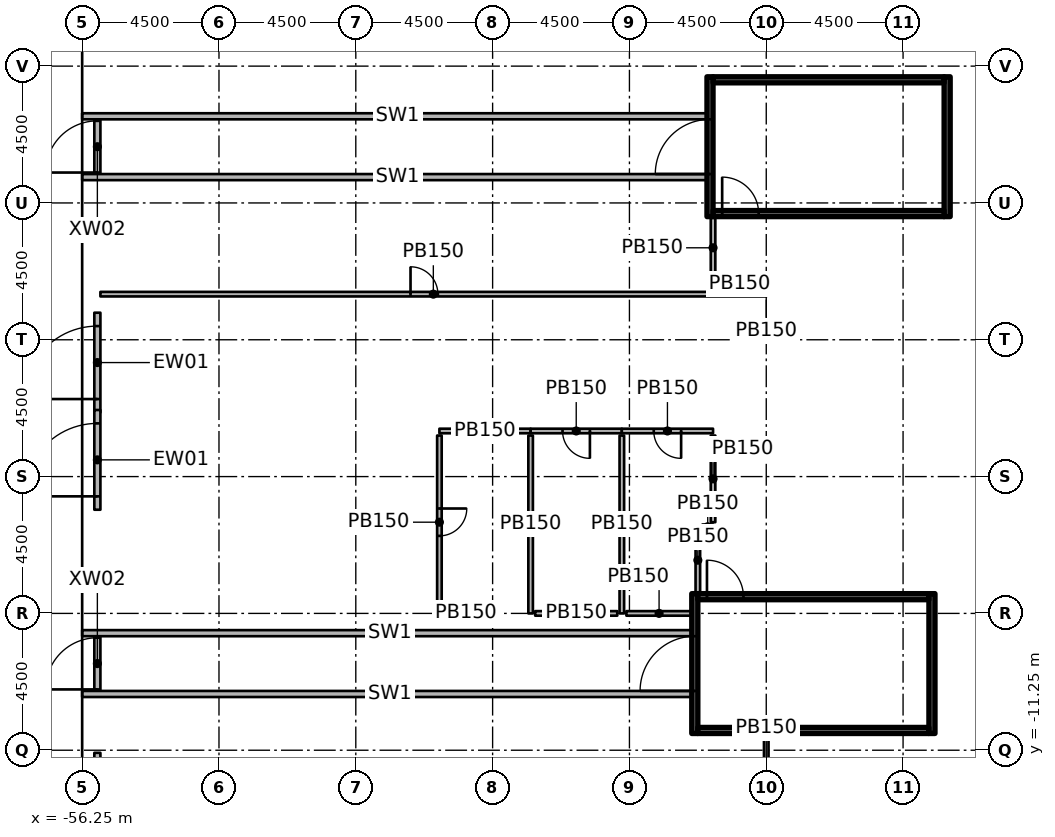
"""IFC4 building model, lengths in metres.
Left out: names, types, materials, properties, quantities, classifications, styles, units other than length and angle.
Written with IfcOpenShell. Run it as: python <this file> out.ifc"""

import sys

from ifc_helpers import new_model, si_unit, direction, frame, frame_2d, origin, origin_2d, place, context, subcontext, project, spatial, rectangle, extrude, element, fill, save


model = new_model("IFC4")
c1 = context("Model", 3, precision=1e-05, world=origin(), true_north=direction((0.0, 1.0)))
c2 = subcontext(c1, "Body", "Model", "MODEL_VIEW")
j1 = project(units=[si_unit("LENGTHUNIT", "METRE"), si_unit("PLANEANGLEUNIT", "RADIAN")], contexts=[c1])
p1 = place(None, origin())
s1 = spatial("IfcSite", under=j1, at=p1, CompositionType="ELEMENT")
p2 = place(p1, origin())
s2 = spatial("IfcBuilding", under=s1, at=p2, CompositionType="ELEMENT")
p3 = place(p2, origin())
s3 = spatial("IfcBuildingStorey", under=s2, at=p3, CompositionType="ELEMENT", Elevation=0.0)
for number, where, z_axis, x_axis in (
    (1, (-55.65, 6.75, 0.0), (0.0, 0.0, 1.0), (1.0, 0.0, 0.0)),
    (2, (-51.15, -11.25, 0.0), (0.0, 0.0, 1.0), (1.0, 0.0, 0.0)),
    (3, (-51.15, 2.25, 0.0), (0.0, 0.0, 1.0), (1.0, 0.0, 0.0)),
    (4, (-46.65, -2.25, 0.0), (0.0, 0.0, 1.0), (1.0, 0.0, 0.0)),
    (5, (-46.65, 11.25, 0.0), (0.0, 0.0, 1.0), (1.0, 0.0, 0.0)),
    (6, (-42.15, 6.75, 0.0), (0.0, 0.0, 1.0), (1.0, 0.0, 0.0)),
    (7, (-37.65, 2.25, 0.0), (0.0, 0.0, 1.0), (1.0, 0.0, 0.0)),
    (8, (-33.11, -2.25, 0.0), (0.0, 0.0, 1.0), (1.0, 0.0, 0.0)),
    (9, (-33.11, 2.25, 0.0), (0.0, 0.0, 1.0), (1.0, 0.0, 0.0)),
    (10, (-28.908, -5.475, 0.0), (0.0, 0.0, 1.0), (1.0, 0.0, 0.0)),
    (11, (-28.908, 5.475, 0.0), (0.0, 0.0, 1.0), (1.0, 0.0, 0.0)),
):
    element("IfcColumn", number, at=place(p3, frame(where, z_axis=z_axis, x_axis=x_axis)), inside=s3, PredefinedType="COLUMN", context=c2, shape_type="SweptSolid", body=[
        extrude(rectangle(XDim=1.2, YDim=1.2, at=origin_2d()), origin(), (0.0, 0.0, 1.0), 6.55),
    ])
p4 = place(p3, frame((-55.75, -0.14, 0.0), z_axis=(0.0, 0.0, 1.0), x_axis=(0.0, 1.0, 0.0)))
e12 = element("IfcWall", 12, at=p4, inside=s3, PredefinedType="SOLIDWALL", context=c2, shape_type="SweptSolid", body=[
    extrude(rectangle(XDim=3.28, YDim=0.2, at=frame_2d((1.64, 0.0))), origin(), (0.0, 0.0, 1.0), 5.6),
])
p5 = place(p4, frame((0.44, 0.0, 0.0)))
e13 = element("IfcOpeningElement", 13, at=p5, cuts=e12, PredefinedType="OPENING", context=c2, shape_type="SweptSolid", body=[
    extrude(rectangle(XDim=2.4, YDim=2.7, at=frame_2d((1.2, 1.35))), frame((0.0, 0.11, 0.0), z_axis=(0.0, -1.0, 0.0), x_axis=(1.0, 0.0, 0.0)), (0.0, 0.0, 1.0), 0.22),
])
p6 = place(p3, frame((-55.75, -3.34, 0.0), z_axis=(0.0, 0.0, 1.0), x_axis=(0.0, 1.0, 0.0)))
e14 = element("IfcWall", 14, at=p6, inside=s3, PredefinedType="SOLIDWALL", context=c2, shape_type="SweptSolid", body=[
    extrude(rectangle(XDim=3.28, YDim=0.2, at=frame_2d((1.64, 0.0))), origin(), (0.0, 0.0, 1.0), 5.6),
])
p7 = place(p6, frame((0.44, 0.0, 0.0)))
e15 = element("IfcOpeningElement", 15, at=p7, cuts=e14, PredefinedType="OPENING", context=c2, shape_type="SweptSolid", body=[
    extrude(rectangle(XDim=2.4, YDim=2.7, at=frame_2d((1.2, 1.35))), frame((0.0, 0.11, 0.0), z_axis=(0.0, -1.0, 0.0), x_axis=(1.0, 0.0, 0.0)), (0.0, 0.0, 1.0), 0.22),
])
p8 = place(p3, frame((-55.75, -14.615, 0.0), z_axis=(0.0, 0.0, 1.0), x_axis=(0.0, 1.0, 0.0)))
e16 = element("IfcWall", 16, at=p8, inside=s3, PredefinedType="SOLIDWALL", context=c2, shape_type="SweptSolid", body=[
    extrude(rectangle(XDim=3.28, YDim=0.2, at=frame_2d((1.64, 0.0))), origin(), (0.0, 0.0, 1.0), 5.6),
])
p9 = place(p8, frame((0.44, 0.0, 0.0)))
e17 = element("IfcOpeningElement", 17, at=p9, cuts=e16, PredefinedType="OPENING", context=c2, shape_type="SweptSolid", body=[
    extrude(rectangle(XDim=2.4, YDim=2.7, at=frame_2d((1.2, 1.35))), frame((0.0, 0.11, 0.0), z_axis=(0.0, -1.0, 0.0), x_axis=(1.0, 0.0, 0.0)), (0.0, 0.0, 1.0), 0.22),
])
p10 = place(p3, frame((-55.75, -9.3, 0.0), z_axis=(0.0, 0.0, 1.0), x_axis=(0.0, 1.0, 0.0)))
e18 = element("IfcWall", 18, at=p10, inside=s3, PredefinedType="SOLIDWALL", context=c2, shape_type="SweptSolid", body=[
    extrude(rectangle(XDim=1.8, YDim=0.2, at=frame_2d((0.9, 0.0))), origin(), (0.0, 0.0, 1.0), 3.0),
])
p11 = place(p10, frame((0.05, 0.0, 0.0)))
e19 = element("IfcOpeningElement", 19, at=p11, cuts=e18, PredefinedType="OPENING", context=c2, shape_type="SweptSolid", body=[
    extrude(rectangle(XDim=1.7, YDim=2.1, at=frame_2d((0.85, 1.05))), frame((0.0, 0.11, 0.0), z_axis=(0.0, -1.0, 0.0), x_axis=(1.0, 0.0, 0.0)), (0.0, 0.0, 1.0), 0.22),
])
p12 = place(p3, frame((-55.75, 7.7, 0.0), z_axis=(0.0, 0.0, 1.0), x_axis=(0.0, 1.0, 0.0)))
e20 = element("IfcWall", 20, at=p12, inside=s3, PredefinedType="SOLIDWALL", context=c2, shape_type="SweptSolid", body=[
    extrude(rectangle(XDim=1.8, YDim=0.2, at=frame_2d((0.9, 0.0))), origin(), (0.0, 0.0, 1.0), 3.0),
])
p13 = place(p12, frame((0.05, 0.0, 0.0)))
e21 = element("IfcOpeningElement", 21, at=p13, cuts=e20, PredefinedType="OPENING", context=c2, shape_type="SweptSolid", body=[
    extrude(rectangle(XDim=1.7, YDim=2.1, at=frame_2d((0.85, 1.05))), frame((0.0, 0.11, 0.0), z_axis=(0.0, -1.0, 0.0), x_axis=(1.0, 0.0, 0.0)), (0.0, 0.0, 1.0), 0.22),
])
p14 = place(p3, frame((-36.1, -10.7, 0.0), z_axis=(0.0, 0.0, 1.0), x_axis=(0.0, 1.0, 0.0)))
e22 = element("IfcWall", 22, at=p14, inside=s3, PredefinedType="SHEAR", context=c2, shape_type="SweptSolid", body=[
    extrude(rectangle(XDim=4.6, YDim=0.2, at=frame_2d((2.3, 0.0))), origin(), (0.0, 0.0, 1.0), 6.55),
])
p15 = place(p14, frame((1.4, 0.0, 0.0)))
e23 = element("IfcOpeningElement", 23, at=p15, cuts=e22, PredefinedType="OPENING", context=c2, shape_type="SweptSolid", body=[
    extrude(rectangle(XDim=1.8, YDim=2.1, at=frame_2d((0.9, 1.05))), frame((0.0, 0.11, 0.0), z_axis=(0.0, -1.0, 0.0), x_axis=(1.0, 0.0, 0.0)), (0.0, 0.0, 1.0), 0.22),
])
p16 = place(p3, frame((-28.3, -10.7, 0.0), z_axis=(0.0, 0.0, 1.0), x_axis=(0.0, 1.0, 0.0)))
e24 = element("IfcWall", 24, at=p16, inside=s3, PredefinedType="SHEAR", context=c2, shape_type="SweptSolid", body=[
    extrude(rectangle(XDim=4.6, YDim=0.2, at=frame_2d((2.3, 0.0))), origin(), (0.0, 0.0, 1.0), 6.55),
])
p17 = place(p3, frame((-36.0, -10.6, 0.0), z_axis=(0.0, 0.0, 1.0), x_axis=(1.0, 0.0, 0.0)))
e25 = element("IfcWall", 25, at=p17, inside=s3, PredefinedType="SHEAR", context=c2, shape_type="SweptSolid", body=[
    extrude(rectangle(XDim=7.6, YDim=0.2, at=frame_2d((3.8, 0.0))), origin(), (0.0, 0.0, 1.0), 6.55),
])
p18 = place(p3, frame((-36.0, -6.2, 0.0), z_axis=(0.0, 0.0, 1.0), x_axis=(1.0, 0.0, 0.0)))
e26 = element("IfcWall", 26, at=p18, inside=s3, PredefinedType="SHEAR", context=c2, shape_type="SweptSolid", body=[
    extrude(rectangle(XDim=7.6, YDim=0.2, at=frame_2d((3.8, 0.0))), origin(), (0.0, 0.0, 1.0), 6.55),
])
p19 = place(p18, frame((0.3, 0.0, 0.0)))
e27 = element("IfcOpeningElement", 27, at=p19, cuts=e26, PredefinedType="OPENING", context=c2, shape_type="SweptSolid", body=[
    extrude(rectangle(XDim=1.2, YDim=2.1, at=frame_2d((0.6, 1.05))), frame((0.0, 0.11, 0.0), z_axis=(0.0, -1.0, 0.0), x_axis=(1.0, 0.0, 0.0)), (0.0, 0.0, 1.0), 0.22),
])
for number, where, z_axis, x_axis in (
    (28, (-56.25, -9.4, 0.0), (0.0, 0.0, 1.0), (1.0, 0.0, 0.0)),
    (29, (-56.25, -7.4, 0.0), (0.0, 0.0, 1.0), (1.0, 0.0, 0.0)),
):
    element("IfcWall", number, at=place(p3, frame(where, z_axis=z_axis, x_axis=x_axis)), inside=s3, PredefinedType="PARTITIONING", context=c2, shape_type="SweptSolid", body=[
        extrude(rectangle(XDim=20.25, YDim=0.2, at=frame_2d((10.125, 0.0))), origin(), (0.0, 0.0, 1.0), 6.55),
    ])
p20 = place(p3, frame((-35.6, 6.3, 0.0), z_axis=(0.0, 0.0, 1.0), x_axis=(0.0, 1.0, 0.0)))
e30 = element("IfcWall", 30, at=p20, inside=s3, PredefinedType="SHEAR", context=c2, shape_type="SweptSolid", body=[
    extrude(rectangle(XDim=4.6, YDim=0.2, at=frame_2d((2.3, 0.0))), origin(), (0.0, 0.0, 1.0), 6.55),
])
p21 = place(p20, frame((1.4, 0.0, 0.0)))
e31 = element("IfcOpeningElement", 31, at=p21, cuts=e30, PredefinedType="OPENING", context=c2, shape_type="SweptSolid", body=[
    extrude(rectangle(XDim=1.8, YDim=2.1, at=frame_2d((0.9, 1.05))), frame((0.0, 0.11, 0.0), z_axis=(0.0, -1.0, 0.0), x_axis=(1.0, 0.0, 0.0)), (0.0, 0.0, 1.0), 0.22),
])
p22 = place(p3, frame((-27.8, 6.3, 0.0), z_axis=(0.0, 0.0, 1.0), x_axis=(0.0, 1.0, 0.0)))
e32 = element("IfcWall", 32, at=p22, inside=s3, PredefinedType="SHEAR", context=c2, shape_type="SweptSolid", body=[
    extrude(rectangle(XDim=4.6, YDim=0.2, at=frame_2d((2.3, 0.0))), origin(), (0.0, 0.0, 1.0), 6.55),
])
p23 = place(p3, frame((-35.5, 6.4, 0.0), z_axis=(0.0, 0.0, 1.0), x_axis=(1.0, 0.0, 0.0)))
e33 = element("IfcWall", 33, at=p23, inside=s3, PredefinedType="SHEAR", context=c2, shape_type="SweptSolid", body=[
    extrude(rectangle(XDim=7.6, YDim=0.2, at=frame_2d((3.8, 0.0))), origin(), (0.0, 0.0, 1.0), 6.55),
])
p24 = place(p23, frame((0.3, 0.0, 0.0)))
e34 = element("IfcOpeningElement", 34, at=p24, cuts=e33, PredefinedType="OPENING", context=c2, shape_type="SweptSolid", body=[
    extrude(rectangle(XDim=1.2, YDim=2.1, at=frame_2d((0.6, 1.05))), frame((0.0, 0.11, 0.0), z_axis=(0.0, -1.0, 0.0), x_axis=(1.0, 0.0, 0.0)), (0.0, 0.0, 1.0), 0.22),
])
p25 = place(p3, frame((-35.5, 10.8, 0.0), z_axis=(0.0, 0.0, 1.0), x_axis=(1.0, 0.0, 0.0)))
e35 = element("IfcWall", 35, at=p25, inside=s3, PredefinedType="SHEAR", context=c2, shape_type="SweptSolid", body=[
    extrude(rectangle(XDim=7.6, YDim=0.2, at=frame_2d((3.8, 0.0))), origin(), (0.0, 0.0, 1.0), 6.55),
])
for number, where, z_axis, x_axis in (
    (36, (-56.25, 7.6, 0.0), (0.0, 0.0, 1.0), (1.0, 0.0, 0.0)),
    (37, (-56.25, 9.6, 0.0), (0.0, 0.0, 1.0), (1.0, 0.0, 0.0)),
):
    element("IfcWall", number, at=place(p3, frame(where, z_axis=z_axis, x_axis=x_axis)), inside=s3, PredefinedType="PARTITIONING", context=c2, shape_type="SweptSolid", body=[
        extrude(rectangle(XDim=20.75, YDim=0.2, at=frame_2d((10.375, 0.0))), origin(), (0.0, 0.0, 1.0), 6.55),
    ])
p26 = place(p3, frame((-36.0, -6.1, 0.0), z_axis=(0.0, 0.0, 1.0), x_axis=(0.0, 1.0, 0.0)))
e38 = element("IfcWall", 38, at=p26, inside=s3, PredefinedType="PARTITIONING", context=c2, shape_type="SweptSolid", body=[
    extrude(rectangle(XDim=2.2, YDim=0.15, at=frame_2d((1.1, 0.0))), origin(), (0.0, 0.0, 1.0), 6.55),
])
p27 = place(p3, frame((-35.85, -3.9, 0.0), z_axis=(0.0, 0.0, 1.0), x_axis=(1.0, 0.0, 0.0)))
e39 = element("IfcWall", 39, at=p27, inside=s3, PredefinedType="PARTITIONING", context=c2, shape_type="SweptSolid", body=[
    extrude(rectangle(XDim=0.35, YDim=0.15, at=frame_2d((0.175, 0.0))), origin(), (0.0, 0.0, 1.0), 6.55),
])
p28 = place(p3, frame((-33.75, 4.1, 0.0), z_axis=(0.0, 0.0, 1.0), x_axis=(-1.0, 0.0, 0.0)))
e40 = element("IfcWall", 40, at=p28, inside=s3, PredefinedType="PARTITIONING", context=c2, shape_type="SweptSolid", body=[
    extrude(rectangle(XDim=1.75, YDim=0.15, at=frame_2d((0.875, 0.0))), origin(), (0.0, 0.0, 1.0), 6.55),
])
p29 = place(p3, frame((-35.5, 4.25, 0.0), z_axis=(0.0, 0.0, 1.0), x_axis=(0.0, 1.0, 0.0)))
e41 = element("IfcWall", 41, at=p29, inside=s3, PredefinedType="PARTITIONING", context=c2, shape_type="SweptSolid", body=[
    extrude(rectangle(XDim=2.05, YDim=0.15, at=frame_2d((1.025, 0.0))), origin(), (0.0, 0.0, 1.0), 6.55),
])
p30 = place(p3, frame((-41.5, -0.75, 0.0), z_axis=(0.0, 0.0, 1.0), x_axis=(-1.0, 0.0, 0.0)))
e42 = element("IfcWall", 42, at=p30, inside=s3, PredefinedType="PARTITIONING", context=c2, shape_type="SweptSolid", body=[
    extrude(rectangle(XDim=3.0, YDim=0.15, at=frame_2d((1.5, 0.0))), origin(), (0.0, 0.0, 1.0), 6.55),
])
p31 = place(p3, frame((-38.5, -0.75, 0.0), z_axis=(0.0, 0.0, 1.0), x_axis=(-1.0, 0.0, 0.0)))
e43 = element("IfcWall", 43, at=p31, inside=s3, PredefinedType="PARTITIONING", context=c2, shape_type="SweptSolid", body=[
    extrude(rectangle(XDim=3.0, YDim=0.15, at=frame_2d((1.5, 0.0))), origin(), (0.0, 0.0, 1.0), 6.55),
])
p32 = place(p31, frame((1.05, 0.0, 0.0)))
e44 = element("IfcOpeningElement", 44, at=p32, cuts=e43, PredefinedType="OPENING", context=c2, shape_type="SweptSolid", body=[
    extrude(rectangle(XDim=0.9, YDim=2.1, at=frame_2d((0.45, 1.05))), frame((0.0, 0.085, 0.0), z_axis=(0.0, -1.0, 0.0), x_axis=(1.0, 0.0, 0.0)), (0.0, 0.0, 1.0), 0.17),
])
p33 = place(p3, frame((-35.5, -0.75, 0.0), z_axis=(0.0, 0.0, 1.0), x_axis=(-1.0, 0.0, 0.0)))
e45 = element("IfcWall", 45, at=p33, inside=s3, PredefinedType="PARTITIONING", context=c2, shape_type="SweptSolid", body=[
    extrude(rectangle(XDim=3.0, YDim=0.15, at=frame_2d((1.5, 0.0))), origin(), (0.0, 0.0, 1.0), 6.55),
])
p34 = place(p33, frame((1.05, 0.0, 0.0)))
e46 = element("IfcOpeningElement", 46, at=p34, cuts=e45, PredefinedType="OPENING", context=c2, shape_type="SweptSolid", body=[
    extrude(rectangle(XDim=0.9, YDim=2.1, at=frame_2d((0.45, 1.05))), frame((0.0, 0.085, 0.0), z_axis=(0.0, -1.0, 0.0), x_axis=(1.0, 0.0, 0.0)), (0.0, 0.0, 1.0), 0.17),
])
p35 = place(p3, frame((-55.65, 3.75, 0.0), z_axis=(0.0, 0.0, 1.0), x_axis=(1.0, 0.0, 0.0)))
e47 = element("IfcWall", 47, at=p35, inside=s3, PredefinedType="PARTITIONING", context=c2, shape_type="SweptSolid", body=[
    extrude(rectangle(XDim=21.9, YDim=0.15, at=frame_2d((10.95, 0.0))), origin(), (0.0, 0.0, 1.0), 6.55),
])
p36 = place(p35, frame((10.2, 0.0, 0.0)))
e48 = element("IfcOpeningElement", 48, at=p36, cuts=e47, PredefinedType="OPENING", context=c2, shape_type="SweptSolid", body=[
    extrude(rectangle(XDim=0.9, YDim=2.1, at=frame_2d((0.45, 1.05))), frame((0.0, 0.085, 0.0), z_axis=(0.0, -1.0, 0.0), x_axis=(1.0, 0.0, 0.0)), (0.0, 0.0, 1.0), 0.17),
])
p37 = place(p3, frame((-41.5, -0.9, 0.0), z_axis=(0.0, 0.0, 1.0), x_axis=(0.0, -1.0, 0.0)))
e49 = element("IfcWall", 49, at=p37, inside=s3, PredefinedType="PARTITIONING", context=c2, shape_type="SweptSolid", body=[
    extrude(rectangle(XDim=5.85, YDim=0.15, at=frame_2d((2.925, 0.0))), origin(), (0.0, 0.0, 1.0), 6.55),
])
p38 = place(p3, frame((-42.75, -6.75, 0.0), z_axis=(0.0, 0.0, 1.0), x_axis=(-1.0, 0.0, 0.0)))
e50 = element("IfcWall", 50, at=p38, inside=s3, PredefinedType="PARTITIONING", context=c2, shape_type="SweptSolid", body=[
    extrude(rectangle(XDim=1.75, YDim=0.15, at=frame_2d((0.875, 0.0))), origin(), (0.0, 0.0, 1.0), 6.55),
])
p39 = place(p3, frame((-44.5, -0.9, 0.0), z_axis=(0.0, 0.0, 1.0), x_axis=(0.0, -1.0, 0.0)))
e51 = element("IfcWall", 51, at=p39, inside=s3, PredefinedType="PARTITIONING", context=c2, shape_type="SweptSolid", body=[
    extrude(rectangle(XDim=5.7, YDim=0.15, at=frame_2d((2.85, 0.0))), origin(), (0.0, 0.0, 1.0), 6.55),
])
p40 = place(p39, frame((2.4, 0.0, 0.0)))
e52 = element("IfcOpeningElement", 52, at=p40, cuts=e51, PredefinedType="OPENING", context=c2, shape_type="SweptSolid", body=[
    extrude(rectangle(XDim=0.9, YDim=2.1, at=frame_2d((0.45, 1.05))), frame((0.0, 0.085, 0.0), z_axis=(0.0, -1.0, 0.0), x_axis=(1.0, 0.0, 0.0)), (0.0, 0.0, 1.0), 0.17),
])
p41 = place(p3, frame((-38.5, -0.9, 0.0), z_axis=(0.0, 0.0, 1.0), x_axis=(0.0, -1.0, 0.0)))
e53 = element("IfcWall", 53, at=p41, inside=s3, PredefinedType="PARTITIONING", context=c2, shape_type="SweptSolid", body=[
    extrude(rectangle(XDim=5.85, YDim=0.15, at=frame_2d((2.925, 0.0))), origin(), (0.0, 0.0, 1.0), 6.55),
])
p42 = place(p3, frame((-38.65, -6.75, 0.0), z_axis=(0.0, 0.0, 1.0), x_axis=(-1.0, 0.0, 0.0)))
e54 = element("IfcWall", 54, at=p42, inside=s3, PredefinedType="PARTITIONING", context=c2, shape_type="SweptSolid", body=[
    extrude(rectangle(XDim=2.7, YDim=0.15, at=frame_2d((1.35, 0.0))), origin(), (0.0, 0.0, 1.0), 6.55),
])
p43 = place(p3, frame((-36.2, -6.75, 0.0), z_axis=(0.0, 0.0, 1.0), x_axis=(-1.0, 0.0, 0.0)))
e55 = element("IfcWall", 55, at=p43, inside=s3, PredefinedType="PARTITIONING", context=c2, shape_type="SweptSolid", body=[
    extrude(rectangle(XDim=2.15, YDim=0.15, at=frame_2d((1.075, 0.0))), origin(), (0.0, 0.0, 1.0), 6.55),
])
p44 = place(p3, frame((-35.5, -0.9, 0.0), z_axis=(0.0, 0.0, 1.0), x_axis=(0.0, -1.0, 0.0)))
e56 = element("IfcWall", 56, at=p44, inside=s3, PredefinedType="PARTITIONING", context=c2, shape_type="SweptSolid", body=[
    extrude(rectangle(XDim=2.85, YDim=0.15, at=frame_2d((1.425, 0.0))), origin(), (0.0, 0.0, 1.0), 6.55),
])
p45 = place(p3, frame((-33.75, 4.1, 0.0), z_axis=(0.0, 0.0, 1.0), x_axis=(0.0, -1.0, 0.0)))
e57 = element("IfcWall", 57, at=p45, inside=s3, PredefinedType="PARTITIONING", context=c2, shape_type="SweptSolid", body=[
    extrude(rectangle(XDim=0.35, YDim=0.15, at=frame_2d((0.175, 0.0))), origin(), (0.0, 0.0, 1.0), 6.55),
])
p46 = place(p3, frame((-33.75, -14.55, 0.0), z_axis=(0.0, 0.0, 1.0), x_axis=(0.0, 1.0, 0.0)))
e58 = element("IfcWall", 58, at=p46, inside=s3, PredefinedType="PARTITIONING", context=c2, shape_type="SweptSolid", body=[
    extrude(rectangle(XDim=4.05, YDim=0.15, at=frame_2d((2.025, 0.0))), origin(), (0.0, 0.0, 1.0), 6.55),
])
p47 = place(p46, frame((1.575, 0.0, 0.0)))
e59 = element("IfcOpeningElement", 59, at=p47, cuts=e58, PredefinedType="OPENING", context=c2, shape_type="SweptSolid", body=[
    extrude(rectangle(XDim=0.9, YDim=2.1, at=frame_2d((0.45, 1.05))), frame((0.0, 0.085, 0.0), z_axis=(0.0, -1.0, 0.0), x_axis=(1.0, 0.0, 0.0)), (0.0, 0.0, 1.0), 0.17),
])
p48 = place(p5, origin())
e60 = element("IfcDoor", 60, at=p48, inside=s3, OperationType="SINGLE_SWING_LEFT", PredefinedType="DOOR", context=c2, shape_type="SweptSolid", body=[
    extrude(rectangle(XDim=2.4, YDim=2.7, at=frame_2d((1.2, 1.35))), frame((0.0, 0.025, 0.0), z_axis=(0.0, -1.0, 0.0), x_axis=(1.0, 0.0, 0.0)), (0.0, 0.0, 1.0), 0.05),
])
fill(e13, e60)
p49 = place(p7, origin())
e61 = element("IfcDoor", 61, at=p49, inside=s3, OperationType="SINGLE_SWING_LEFT", PredefinedType="DOOR", context=c2, shape_type="SweptSolid", body=[
    extrude(rectangle(XDim=2.4, YDim=2.7, at=frame_2d((1.2, 1.35))), frame((0.0, 0.025, 0.0), z_axis=(0.0, -1.0, 0.0), x_axis=(1.0, 0.0, 0.0)), (0.0, 0.0, 1.0), 0.05),
])
fill(e15, e61)
p50 = place(p11, origin())
e62 = element("IfcDoor", 62, at=p50, inside=s3, OperationType="SINGLE_SWING_LEFT", PredefinedType="DOOR", context=c2, shape_type="SweptSolid", body=[
    extrude(rectangle(XDim=1.7, YDim=2.1, at=frame_2d((0.85, 1.05))), frame((0.0, 0.025, 0.0), z_axis=(0.0, -1.0, 0.0), x_axis=(1.0, 0.0, 0.0)), (0.0, 0.0, 1.0), 0.05),
])
fill(e19, e62)
p51 = place(p13, origin())
e63 = element("IfcDoor", 63, at=p51, inside=s3, OperationType="SINGLE_SWING_LEFT", PredefinedType="DOOR", context=c2, shape_type="SweptSolid", body=[
    extrude(rectangle(XDim=1.7, YDim=2.1, at=frame_2d((0.85, 1.05))), frame((0.0, 0.025, 0.0), z_axis=(0.0, -1.0, 0.0), x_axis=(1.0, 0.0, 0.0)), (0.0, 0.0, 1.0), 0.05),
])
fill(e21, e63)
p52 = place(p19, origin())
e64 = element("IfcDoor", 64, at=p52, inside=s3, OperationType="SINGLE_SWING_RIGHT", PredefinedType="DOOR", context=c2, shape_type="SweptSolid", body=[
    extrude(rectangle(XDim=1.2, YDim=2.1, at=frame_2d((0.6, 1.05))), frame((0.0, 0.025, 0.0), z_axis=(0.0, -1.0, 0.0), x_axis=(1.0, 0.0, 0.0)), (0.0, 0.0, 1.0), 0.05),
])
fill(e27, e64)
p53 = place(p15, origin())
e65 = element("IfcDoor", 65, at=p53, inside=s3, OperationType="DOUBLE_DOOR_SINGLE_SWING", PredefinedType="DOOR", context=c2, shape_type="SweptSolid", body=[
    extrude(rectangle(XDim=1.8, YDim=2.1, at=frame_2d((0.9, 1.05))), frame((0.0, 0.025, 0.0), z_axis=(0.0, -1.0, 0.0), x_axis=(1.0, 0.0, 0.0)), (0.0, 0.0, 1.0), 0.05),
])
fill(e23, e65)
p54 = place(p24, origin())
e66 = element("IfcDoor", 66, at=p54, inside=s3, OperationType="SINGLE_SWING_RIGHT", PredefinedType="DOOR", context=c2, shape_type="SweptSolid", body=[
    extrude(rectangle(XDim=1.2, YDim=2.1, at=frame_2d((0.6, 1.05))), frame((0.0, 0.025, 0.0), z_axis=(0.0, -1.0, 0.0), x_axis=(1.0, 0.0, 0.0)), (0.0, 0.0, 1.0), 0.05),
])
fill(e34, e66)
p55 = place(p21, origin())
e67 = element("IfcDoor", 67, at=p55, inside=s3, OperationType="DOUBLE_DOOR_SINGLE_SWING", PredefinedType="DOOR", context=c2, shape_type="SweptSolid", body=[
    extrude(rectangle(XDim=1.8, YDim=2.1, at=frame_2d((0.9, 1.05))), frame((0.0, 0.025, 0.0), z_axis=(0.0, -1.0, 0.0), x_axis=(1.0, 0.0, 0.0)), (0.0, 0.0, 1.0), 0.05),
])
fill(e31, e67)
p56 = place(p32, origin())
e68 = element("IfcDoor", 68, at=p56, inside=s3, OperationType="SINGLE_SWING_LEFT", PredefinedType="DOOR", context=c2, shape_type="SweptSolid", body=[
    extrude(rectangle(XDim=0.9, YDim=2.1, at=frame_2d((0.45, 1.05))), frame((0.0, 0.025, 0.0), z_axis=(0.0, -1.0, 0.0), x_axis=(1.0, 0.0, 0.0)), (0.0, 0.0, 1.0), 0.05),
])
fill(e44, e68)
p57 = place(p34, origin())
e69 = element("IfcDoor", 69, at=p57, inside=s3, OperationType="SINGLE_SWING_LEFT", PredefinedType="DOOR", context=c2, shape_type="SweptSolid", body=[
    extrude(rectangle(XDim=0.9, YDim=2.1, at=frame_2d((0.45, 1.05))), frame((0.0, 0.025, 0.0), z_axis=(0.0, -1.0, 0.0), x_axis=(1.0, 0.0, 0.0)), (0.0, 0.0, 1.0), 0.05),
])
fill(e46, e69)
p58 = place(p36, origin())
e70 = element("IfcDoor", 70, at=p58, inside=s3, OperationType="SINGLE_SWING_LEFT", PredefinedType="DOOR", context=c2, shape_type="SweptSolid", body=[
    extrude(rectangle(XDim=0.9, YDim=2.1, at=frame_2d((0.45, 1.05))), frame((0.0, 0.025, 0.0), z_axis=(0.0, -1.0, 0.0), x_axis=(1.0, 0.0, 0.0)), (0.0, 0.0, 1.0), 0.05),
])
fill(e48, e70)
p59 = place(p40, origin())
e71 = element("IfcDoor", 71, at=p59, inside=s3, OperationType="SINGLE_SWING_LEFT", PredefinedType="DOOR", context=c2, shape_type="SweptSolid", body=[
    extrude(rectangle(XDim=0.9, YDim=2.1, at=frame_2d((0.45, 1.05))), frame((0.0, 0.025, 0.0), z_axis=(0.0, -1.0, 0.0), x_axis=(1.0, 0.0, 0.0)), (0.0, 0.0, 1.0), 0.05),
])
fill(e52, e71)
save(model, sys.argv[1])
